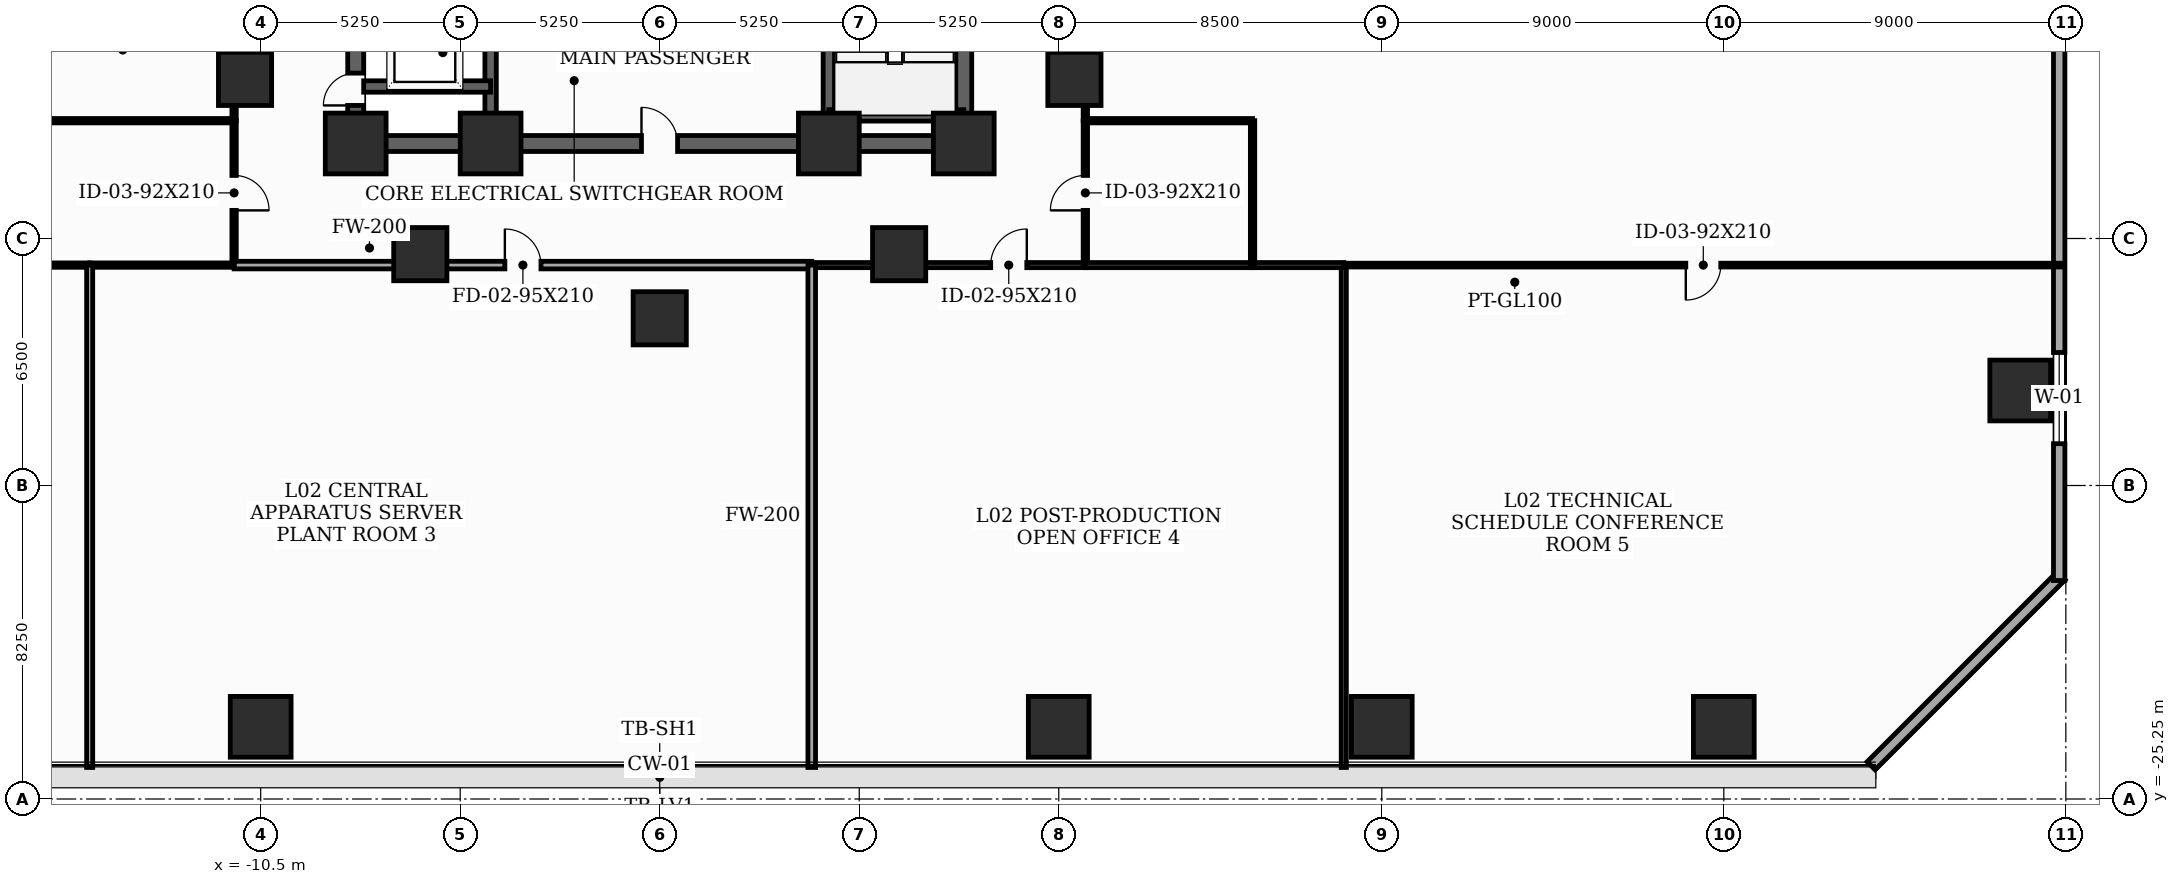
"""IFC4 building model, lengths in metres.
Left out: names, types, materials, properties, quantities, classifications, styles, units other than length and angle.
Written with IfcOpenShell. Run it as: python <this file> out.ifc"""

import sys

from ifc_helpers import new_model, si_unit, direction, frame, frame_2d, origin, origin_2d, place, context, subcontext, project, spatial, rectangle, extrude, element, fill, save


model = new_model("IFC4")
c1 = context("Model", 3, precision=1e-05, world=origin(), true_north=direction((0.0, 1.0)))
c2 = subcontext(c1, "Body", "Model", "MODEL_VIEW")
j1 = project(units=[si_unit("LENGTHUNIT", "METRE"), si_unit("PLANEANGLEUNIT", "RADIAN")], contexts=[c1])
p1 = place(None, origin())
s1 = spatial("IfcSite", under=j1, at=p1, CompositionType="ELEMENT")
p2 = place(p1, origin())
s2 = spatial("IfcBuilding", under=s1, at=p2, CompositionType="ELEMENT")
p3 = place(p2, frame((0.0, 0.0, 10.4)))
s3 = spatial("IfcBuildingStorey", under=s2, at=p3, CompositionType="ELEMENT", Elevation=10.4)
for number, where, z_axis, x_axis in (
    (1, (-8.0, -8.0, 0.0), (0.0, 0.0, 1.0), (1.0, 0.0, 0.0)),
    (2, (-4.45, -8.0, 0.0), (0.0, 0.0, 1.0), (1.0, 0.0, 0.0)),
    (3, (4.45, -8.0, 0.0), (0.0, 0.0, 1.0), (1.0, 0.0, 0.0)),
    (4, (8.0, -8.0, 0.0), (0.0, 0.0, 1.0), (1.0, 0.0, 0.0)),
):
    element("IfcColumn", number, at=place(p3, frame(where, z_axis=z_axis, x_axis=x_axis)), inside=s3, PredefinedType="COLUMN", context=c2, shape_type="SweptSolid", body=[
        extrude(rectangle(XDim=1.6, YDim=1.6, at=origin_2d()), origin(), (0.0, 0.0, 1.0), 5.2),
    ])
for number, where, z_axis, x_axis in (
    (5, (-10.912, -6.3, 0.0), (0.0, 0.0, 1.0), (1.0, 0.0, 0.0)),
    (6, (-6.3, -10.912, 0.0), (0.0, 0.0, 1.0), (1.0, 0.0, 0.0)),
    (7, (0.0, -12.6, 0.0), (0.0, 0.0, 1.0), (1.0, 0.0, 0.0)),
    (8, (6.3, -10.912, 0.0), (0.0, 0.0, 1.0), (1.0, 0.0, 0.0)),
    (9, (10.912, -6.3, 0.0), (0.0, 0.0, 1.0), (1.0, 0.0, 0.0)),
):
    element("IfcColumn", number, at=place(p3, frame(where, z_axis=z_axis, x_axis=x_axis)), inside=s3, PredefinedType="COLUMN", context=c2, shape_type="SweptSolid", body=[
        extrude(rectangle(XDim=1.4, YDim=1.4, at=origin_2d()), origin(), (0.0, 0.0, 1.0), 5.2),
    ])
for number, where, z_axis, x_axis in (
    (10, (-10.5, -23.35, 0.0), (0.0, 0.0, 1.0), (1.0, 0.0, 0.0)),
    (11, (10.5, -23.35, 0.0), (0.0, 0.0, 1.0), (1.0, 0.0, 0.0)),
    (12, (19.0, -23.35, 0.0), (0.0, 0.0, 1.0), (1.0, 0.0, 0.0)),
    (13, (28.0, -23.35, 0.0), (0.0, 0.0, 1.0), (1.0, 0.0, 0.0)),
    (14, (35.8, -14.5, 0.0), (0.0, 0.0, 1.0), (1.0, 0.0, 0.0)),
):
    element("IfcColumn", number, at=place(p3, frame(where, z_axis=z_axis, x_axis=x_axis)), inside=s3, PredefinedType="COLUMN", context=c2, shape_type="SweptSolid", body=[
        extrude(rectangle(XDim=1.6, YDim=1.6, at=origin_2d()), origin(), (0.0, 0.0, 1.0), 5.2),
    ])
p4 = place(p3, frame((31.876, -24.376, 0.0), z_axis=(0.0, 0.0, 1.0), x_axis=(0.707106781187, 0.707106781187, 0.0)))
e15 = element("IfcWall", 15, at=p4, inside=s3, PredefinedType="SOLIDWALL", context=c2, shape_type="SweptSolid", body=[
    extrude(rectangle(XDim=7.071, YDim=0.3, at=frame_2d((3.536, 0.0))), origin(), (0.0, 0.0, 1.0), 4.95),
])
p5 = place(p3, frame((36.825, -19.5, 0.0), z_axis=(0.0, 0.0, 1.0), x_axis=(0.0, 1.0, 0.0)))
e16 = element("IfcWall", 16, at=p5, inside=s3, PredefinedType="SOLIDWALL", context=c2, shape_type="SweptSolid", body=[
    extrude(rectangle(XDim=48.0, YDim=0.3, at=frame_2d((24.0, 0.0))), origin(), (0.0, 0.0, 1.0), 4.95),
])
p6 = place(p5, frame((3.6, 0.0, 0.9)))
e17 = element("IfcOpeningElement", 17, at=p6, cuts=e16, PredefinedType="OPENING", context=c2, shape_type="SweptSolid", body=[
    extrude(rectangle(XDim=2.4, YDim=1.35, at=frame_2d((1.2, 0.675))), frame((0.0, 0.16, 0.0), z_axis=(0.0, -1.0, 0.0), x_axis=(1.0, 0.0, 0.0)), (0.0, 0.0, 1.0), 0.32),
])
p7 = place(p5, frame((22.8, 0.0, 0.9)))
e18 = element("IfcOpeningElement", 18, at=p7, cuts=e16, PredefinedType="OPENING", context=c2, shape_type="SweptSolid", body=[
    extrude(rectangle(XDim=1.8, YDim=1.35, at=frame_2d((0.9, 0.675))), frame((0.0, 0.16, 0.0), z_axis=(0.0, -1.0, 0.0), x_axis=(1.0, 0.0, 0.0)), (0.0, 0.0, 1.0), 0.32),
])
p8 = place(p5, frame((33.8, 0.0, 0.9)))
e19 = element("IfcOpeningElement", 19, at=p8, cuts=e16, PredefinedType="OPENING", context=c2, shape_type="SweptSolid", body=[
    extrude(rectangle(XDim=2.4, YDim=1.35, at=frame_2d((1.2, 0.675))), frame((0.0, 0.16, 0.0), z_axis=(0.0, -1.0, 0.0), x_axis=(1.0, 0.0, 0.0)), (0.0, 0.0, 1.0), 0.32),
])
p9 = place(p3, frame((-8.0, -8.0, 0.0), z_axis=(0.0, 0.0, 1.0), x_axis=(0.0, 1.0, 0.0)))
e20 = element("IfcWall", 20, at=p9, inside=s3, PredefinedType="SHEAR", context=c2, shape_type="SweptSolid", body=[
    extrude(rectangle(XDim=16.0, YDim=0.42, at=frame_2d((8.0, 0.0))), origin(), (0.0, 0.0, 1.0), 4.95),
])
p10 = place(p9, frame((1.002, 0.0, 0.0)))
e21 = element("IfcOpeningElement", 21, at=p10, cuts=e20, PredefinedType="OPENING", context=c2, shape_type="SweptSolid", body=[
    extrude(rectangle(XDim=0.85, YDim=2.02, at=frame_2d((0.425, 1.01))), frame((0.0, 0.22, 0.0), z_axis=(0.0, -1.0, 0.0), x_axis=(1.0, 0.0, 0.0)), (0.0, 0.0, 1.0), 0.44),
])
p11 = place(p9, frame((5.35, 0.0, 0.0)))
e22 = element("IfcOpeningElement", 22, at=p11, cuts=e20, PredefinedType="OPENING", context=c2, shape_type="SweptSolid", body=[
    extrude(rectangle(XDim=1.05, YDim=2.15, at=frame_2d((0.525, 1.075))), frame((0.0, 0.22, 0.0), z_axis=(0.0, -1.0, 0.0), x_axis=(1.0, 0.0, 0.0)), (0.0, 0.0, 1.0), 0.44),
])
p12 = place(p3, frame((8.0, -8.0, 0.0), z_axis=(0.0, 0.0, 1.0), x_axis=(0.0, 1.0, 0.0)))
e23 = element("IfcWall", 23, at=p12, inside=s3, PredefinedType="SHEAR", context=c2, shape_type="SweptSolid", body=[
    extrude(rectangle(XDim=16.0, YDim=0.42, at=frame_2d((8.0, 0.0))), origin(), (0.0, 0.0, 1.0), 4.95),
])
p13 = place(p12, frame((9.6, 0.0, 0.0)))
e24 = element("IfcOpeningElement", 24, at=p13, cuts=e23, PredefinedType="OPENING", context=c2, shape_type="SweptSolid", body=[
    extrude(rectangle(XDim=1.05, YDim=2.15, at=frame_2d((0.525, 1.075))), frame((0.0, 0.22, 0.0), z_axis=(0.0, -1.0, 0.0), x_axis=(1.0, 0.0, 0.0)), (0.0, 0.0, 1.0), 0.44),
])
p14 = place(p12, frame((14.148, 0.0, 0.0)))
e25 = element("IfcOpeningElement", 25, at=p14, cuts=e23, PredefinedType="OPENING", context=c2, shape_type="SweptSolid", body=[
    extrude(rectangle(XDim=0.85, YDim=2.02, at=frame_2d((0.425, 1.01))), frame((0.0, 0.22, 0.0), z_axis=(0.0, -1.0, 0.0), x_axis=(1.0, 0.0, 0.0)), (0.0, 0.0, 1.0), 0.44),
])
p15 = place(p3, frame((-8.0, -8.0, 0.0), z_axis=(0.0, 0.0, 1.0), x_axis=(1.0, 0.0, 0.0)))
e26 = element("IfcWall", 26, at=p15, inside=s3, PredefinedType="SHEAR", context=c2, shape_type="SweptSolid", body=[
    extrude(rectangle(XDim=16.0, YDim=0.42, at=frame_2d((8.0, 0.0))), origin(), (0.0, 0.0, 1.0), 4.95),
])
p16 = place(p15, frame((7.52, 0.0, 0.0)))
e27 = element("IfcOpeningElement", 27, at=p16, cuts=e26, PredefinedType="OPENING", context=c2, shape_type="SweptSolid", body=[
    extrude(rectangle(XDim=0.95, YDim=2.1, at=frame_2d((0.475, 1.05))), frame((0.0, 0.22, 0.0), z_axis=(0.0, -1.0, 0.0), x_axis=(1.0, 0.0, 0.0)), (0.0, 0.0, 1.0), 0.44),
])
for number, where, z_axis, x_axis in (
    (28, (-4.45, -7.79, 0.0), (0.0, 0.0, 1.0), (0.0, 1.0, 0.0)),
    (29, (4.45, -7.79, 0.0), (0.0, 0.0, 1.0), (0.0, 1.0, 0.0)),
):
    element("IfcWall", number, at=place(p3, frame(where, z_axis=z_axis, x_axis=x_axis)), inside=s3, PredefinedType="SHEAR", context=c2, shape_type="SweptSolid", body=[
        extrude(rectangle(XDim=15.58, YDim=0.3, at=frame_2d((7.79, 0.0))), origin(), (0.0, 0.0, 1.0), 4.95),
    ])
p17 = place(p3, frame((4.45, -7.26, 0.0), z_axis=(0.0, 0.0, 1.0), x_axis=(1.0, 0.0, 0.0)))
e30 = element("IfcWall", 30, at=p17, inside=s3, PredefinedType="SHEAR", context=c2, shape_type="SweptSolid", body=[
    extrude(rectangle(XDim=3.55, YDim=0.3, at=frame_2d((1.775, 0.0))), origin(), (0.0, 0.0, 1.0), 4.95),
])
p18 = place(p3, frame((-7.79, -6.5, 0.0), z_axis=(0.0, 0.0, 1.0), x_axis=(1.0, 0.0, 0.0)))
e31 = element("IfcWall", 31, at=p18, inside=s3, PredefinedType="SHEAR", context=c2, shape_type="SweptSolid", body=[
    extrude(rectangle(XDim=3.34, YDim=0.3, at=frame_2d((1.67, 0.0))), origin(), (0.0, 0.0, 1.0), 4.95),
])
p19 = place(p3, frame((-11.2, -3.6, 0.0), z_axis=(0.0, 0.0, 1.0), x_axis=(0.0, -1.0, 0.0)))
e32 = element("IfcWall", 32, at=p19, inside=s3, PredefinedType="PARTITIONING", context=c2, shape_type="SweptSolid", body=[
    extrude(rectangle(XDim=3.8, YDim=0.115, at=frame_2d((1.9, 0.0))), origin(), (0.0, 0.0, 1.0), 4.235),
])
p20 = place(p19, frame((0.604, 0.0, 0.0)))
e33 = element("IfcOpeningElement", 33, at=p20, cuts=e32, PredefinedType="OPENING", context=c2, shape_type="SweptSolid", body=[
    extrude(rectangle(XDim=0.92, YDim=2.1, at=frame_2d((0.46, 1.05))), frame((0.0, 0.067, 0.0), z_axis=(0.0, -1.0, 0.0), x_axis=(1.0, 0.0, 0.0)), (0.0, 0.0, 1.0), 0.135),
])
p21 = place(p3, frame((-11.2, -7.4, 0.0), z_axis=(0.0, 0.0, 1.0), x_axis=(0.0, -1.0, 0.0)))
e34 = element("IfcWall", 34, at=p21, inside=s3, PredefinedType="PARTITIONING", context=c2, shape_type="SweptSolid", body=[
    extrude(rectangle(XDim=3.8, YDim=0.115, at=frame_2d((1.9, 0.0))), origin(), (0.0, 0.0, 1.0), 4.95),
])
p22 = place(p21, frame((1.44, 0.0, 0.0)))
e35 = element("IfcOpeningElement", 35, at=p22, cuts=e34, PredefinedType="OPENING", context=c2, shape_type="SweptSolid", body=[
    extrude(rectangle(XDim=0.92, YDim=2.1, at=frame_2d((0.46, 1.05))), frame((0.0, 0.067, 0.0), z_axis=(0.0, -1.0, 0.0), x_axis=(1.0, 0.0, 0.0)), (0.0, 0.0, 1.0), 0.135),
])
p23 = place(p3, frame((-11.2, -11.2, 0.0), z_axis=(0.0, 0.0, 1.0), x_axis=(1.0, 0.0, 0.0)))
e36 = element("IfcWall", 36, at=p23, inside=s3, PredefinedType="SOLIDWALL", context=c2, shape_type="SweptSolid", body=[
    extrude(rectangle(XDim=15.2, YDim=0.2, at=frame_2d((7.6, 0.0))), origin(), (0.0, 0.0, 1.0), 3.435),
])
p24 = place(p23, frame((7.125, 0.0, 0.0)))
e37 = element("IfcOpeningElement", 37, at=p24, cuts=e36, PredefinedType="OPENING", context=c2, shape_type="SweptSolid", body=[
    extrude(rectangle(XDim=0.95, YDim=2.1, at=frame_2d((0.475, 1.05))), frame((0.0, 0.11, 0.0), z_axis=(0.0, -1.0, 0.0), x_axis=(1.0, 0.0, 0.0)), (0.0, 0.0, 1.0), 0.22),
])
p25 = place(p3, frame((4.0, -11.2, 0.0), z_axis=(0.0, 0.0, 1.0), x_axis=(1.0, 0.0, 0.0)))
e38 = element("IfcWall", 38, at=p25, inside=s3, PredefinedType="PARTITIONING", context=c2, shape_type="SweptSolid", body=[
    extrude(rectangle(XDim=7.2, YDim=0.135, at=frame_2d((3.6, 0.0))), origin(), (0.0, 0.0, 1.0), 3.435),
])
p26 = place(p25, frame((4.709, 0.0, 0.0)))
e39 = element("IfcOpeningElement", 39, at=p26, cuts=e38, PredefinedType="OPENING", context=c2, shape_type="SweptSolid", body=[
    extrude(rectangle(XDim=0.95, YDim=2.1, at=frame_2d((0.475, 1.05))), frame((0.0, 0.077, 0.0), z_axis=(0.0, -1.0, 0.0), x_axis=(1.0, 0.0, 0.0)), (0.0, 0.0, 1.0), 0.155),
])
p27 = place(p3, frame((11.2, -11.2, 0.0), z_axis=(0.0, 0.0, 1.0), x_axis=(0.0, 1.0, 0.0)))
e40 = element("IfcWall", 40, at=p27, inside=s3, PredefinedType="PARTITIONING", context=c2, shape_type="SweptSolid", body=[
    extrude(rectangle(XDim=3.8, YDim=0.115, at=frame_2d((1.9, 0.0))), origin(), (0.0, 0.0, 1.0), 4.95),
])
p28 = place(p27, frame((1.44, 0.0, 0.0)))
e41 = element("IfcOpeningElement", 41, at=p28, cuts=e40, PredefinedType="OPENING", context=c2, shape_type="SweptSolid", body=[
    extrude(rectangle(XDim=0.92, YDim=2.1, at=frame_2d((0.46, 1.05))), frame((0.0, 0.067, 0.0), z_axis=(0.0, -1.0, 0.0), x_axis=(1.0, 0.0, 0.0)), (0.0, 0.0, 1.0), 0.135),
])
p29 = place(p3, frame((11.2, -7.4, 0.0), z_axis=(0.0, 0.0, 1.0), x_axis=(0.0, 1.0, 0.0)))
e42 = element("IfcWall", 42, at=p29, inside=s3, PredefinedType="PARTITIONING", context=c2, shape_type="SweptSolid", body=[
    extrude(rectangle(XDim=11.7, YDim=0.115, at=frame_2d((5.85, 0.0))), origin(), (0.0, 0.0, 1.0), 4.235),
])
p30 = place(p3, frame((-16.2, -7.4, 0.0), z_axis=(0.0, 0.0, 1.0), x_axis=(1.0, 0.0, 0.0)))
e43 = element("IfcWall", 43, at=p30, inside=s3, PredefinedType="PARTITIONING", context=c2, shape_type="SweptSolid", body=[
    extrude(rectangle(XDim=5.0, YDim=0.115, at=frame_2d((2.5, 0.0))), origin(), (0.0, 0.0, 1.0), 4.95),
])
p31 = place(p3, frame((-16.2, -11.2, 0.0), z_axis=(0.0, 0.0, 1.0), x_axis=(1.0, 0.0, 0.0)))
e44 = element("IfcWall", 44, at=p31, inside=s3, PredefinedType="PARTITIONING", context=c2, shape_type="SweptSolid", body=[
    extrude(rectangle(XDim=1.2, YDim=0.115, at=frame_2d((0.6, 0.0))), origin(), (0.0, 0.0, 1.0), 4.95),
])
p32 = place(p3, frame((-15.0, -11.2, 0.0), z_axis=(0.0, 0.0, 1.0), x_axis=(1.0, 0.0, 0.0)))
e45 = element("IfcWall", 45, at=p32, inside=s3, PredefinedType="PARTITIONING", context=c2, shape_type="SweptSolid", body=[
    extrude(rectangle(XDim=3.8, YDim=0.115, at=frame_2d((1.9, 0.0))), origin(), (0.0, 0.0, 1.0), 4.95),
])
p33 = place(p3, frame((-15.0, -24.42, 0.0), z_axis=(0.0, 0.0, 1.0), x_axis=(0.0, 1.0, 0.0)))
e46 = element("IfcWall", 46, at=p33, inside=s3, PredefinedType="PARTITIONING", context=c2, shape_type="SweptSolid", body=[
    extrude(rectangle(XDim=13.22, YDim=0.16, at=frame_2d((6.61, 0.0))), origin(), (0.0, 0.0, 1.0), 3.435),
])
p34 = place(p3, frame((4.0, -24.42, 0.0), z_axis=(0.0, 0.0, 1.0), x_axis=(0.0, 1.0, 0.0)))
e47 = element("IfcWall", 47, at=p34, inside=s3, PredefinedType="SOLIDWALL", context=c2, shape_type="SweptSolid", body=[
    extrude(rectangle(XDim=13.22, YDim=0.2, at=frame_2d((6.61, 0.0))), origin(), (0.0, 0.0, 1.0), 4.235),
])
p35 = place(p3, frame((15.6, -11.2, 0.0), z_axis=(0.0, 0.0, 1.0), x_axis=(-1.0, 0.0, 0.0)))
e48 = element("IfcWall", 48, at=p35, inside=s3, PredefinedType="PARTITIONING", context=c2, shape_type="SweptSolid", body=[
    extrude(rectangle(XDim=4.4, YDim=0.135, at=frame_2d((2.2, 0.0))), origin(), (0.0, 0.0, 1.0), 4.95),
])
p36 = place(p3, frame((18.0, -24.42, 0.0), z_axis=(0.0, 0.0, 1.0), x_axis=(0.0, 1.0, 0.0)))
e49 = element("IfcWall", 49, at=p36, inside=s3, PredefinedType="PARTITIONING", context=c2, shape_type="SweptSolid", body=[
    extrude(rectangle(XDim=13.22, YDim=0.135, at=frame_2d((6.61, 0.0))), origin(), (0.0, 0.0, 1.0), 3.435),
])
p37 = place(p3, frame((18.0, -11.2, 0.0), z_axis=(0.0, 0.0, 1.0), x_axis=(-1.0, 0.0, 0.0)))
e50 = element("IfcWall", 50, at=p37, inside=s3, PredefinedType="PARTITIONING", context=c2, shape_type="SweptSolid", body=[
    extrude(rectangle(XDim=2.4, YDim=0.135, at=frame_2d((1.2, 0.0))), origin(), (0.0, 0.0, 1.0), 4.95),
])
p38 = place(p3, frame((15.6, -11.2, 0.0), z_axis=(0.0, 0.0, 1.0), x_axis=(0.0, 1.0, 0.0)))
e51 = element("IfcWall", 51, at=p38, inside=s3, PredefinedType="PARTITIONING", context=c2, shape_type="SweptSolid", body=[
    extrude(rectangle(XDim=3.8, YDim=0.115, at=frame_2d((1.9, 0.0))), origin(), (0.0, 0.0, 1.0), 4.95),
])
p39 = place(p3, frame((15.6, -7.4, 0.0), z_axis=(0.0, 0.0, 1.0), x_axis=(-1.0, 0.0, 0.0)))
e52 = element("IfcWall", 52, at=p39, inside=s3, PredefinedType="PARTITIONING", context=c2, shape_type="SweptSolid", body=[
    extrude(rectangle(XDim=4.4, YDim=0.115, at=frame_2d((2.2, 0.0))), origin(), (0.0, 0.0, 1.0), 4.95),
])
p40 = place(p3, frame((36.92, -11.2, 0.0), z_axis=(0.0, 0.0, 1.0), x_axis=(-1.0, 0.0, 0.0)))
e53 = element("IfcWall", 53, at=p40, inside=s3, PredefinedType="MOVABLE", context=c2, shape_type="SweptSolid", body=[
    extrude(rectangle(XDim=18.92, YDim=0.1, at=frame_2d((9.46, 0.0))), origin(), (0.0, 0.0, 1.0), 3.435),
])
p41 = place(p40, frame((9.0, 0.0, 0.0)))
e54 = element("IfcOpeningElement", 54, at=p41, cuts=e53, PredefinedType="OPENING", context=c2, shape_type="SweptSolid", body=[
    extrude(rectangle(XDim=0.92, YDim=2.1, at=frame_2d((0.46, 1.05))), frame((0.0, 0.06, 0.0), z_axis=(0.0, -1.0, 0.0), x_axis=(1.0, 0.0, 0.0)), (0.0, 0.0, 1.0), 0.12),
])
p42 = place(p6, origin())
e55 = element("IfcWindow", 55, at=p42, inside=s3, PartitioningType="SINGLE_PANEL", PredefinedType="WINDOW", context=c2, shape_type="SweptSolid", body=[
    extrude(rectangle(XDim=2.4, YDim=1.35, at=frame_2d((1.2, 0.675))), frame((0.0, 0.03, 0.0), z_axis=(0.0, -1.0, 0.0), x_axis=(1.0, 0.0, 0.0)), (0.0, 0.0, 1.0), 0.06),
])
fill(e17, e55)
p43 = place(p10, origin())
e56 = element("IfcDoor", 56, at=p43, inside=s3, OperationType="SINGLE_SWING_LEFT", PredefinedType="TRAPDOOR", context=c2, shape_type="SweptSolid", body=[
    extrude(rectangle(XDim=0.85, YDim=2.02, at=frame_2d((0.425, 1.01))), frame((0.0, 0.025, 0.0), z_axis=(0.0, -1.0, 0.0), x_axis=(1.0, 0.0, 0.0)), (0.0, 0.0, 1.0), 0.05),
])
fill(e21, e56)
p44 = place(p16, origin())
e57 = element("IfcDoor", 57, at=p44, inside=s3, OperationType="SINGLE_SWING_LEFT", PredefinedType="DOOR", context=c2, shape_type="SweptSolid", body=[
    extrude(rectangle(XDim=0.95, YDim=2.1, at=frame_2d((0.475, 1.05))), frame((0.0, 0.025, 0.0), z_axis=(0.0, -1.0, 0.0), x_axis=(1.0, 0.0, 0.0)), (0.0, 0.0, 1.0), 0.05),
])
fill(e27, e57)
p45 = place(p22, origin())
e58 = element("IfcDoor", 58, at=p45, inside=s3, OperationType="SINGLE_SWING_RIGHT", PredefinedType="DOOR", context=c2, shape_type="SweptSolid", body=[
    extrude(rectangle(XDim=0.92, YDim=2.1, at=frame_2d((0.46, 1.05))), frame((0.0, 0.025, 0.0), z_axis=(0.0, -1.0, 0.0), x_axis=(1.0, 0.0, 0.0)), (0.0, 0.0, 1.0), 0.05),
])
fill(e35, e58)
p46 = place(p24, origin())
e59 = element("IfcDoor", 59, at=p46, inside=s3, OperationType="SINGLE_SWING_LEFT", PredefinedType="DOOR", context=c2, shape_type="SweptSolid", body=[
    extrude(rectangle(XDim=0.95, YDim=2.1, at=frame_2d((0.475, 1.05))), frame((0.0, 0.025, 0.0), z_axis=(0.0, -1.0, 0.0), x_axis=(1.0, 0.0, 0.0)), (0.0, 0.0, 1.0), 0.05),
])
fill(e37, e59)
p47 = place(p26, origin())
e60 = element("IfcDoor", 60, at=p47, inside=s3, OperationType="SINGLE_SWING_RIGHT", PredefinedType="DOOR", context=c2, shape_type="SweptSolid", body=[
    extrude(rectangle(XDim=0.95, YDim=2.1, at=frame_2d((0.475, 1.05))), frame((0.0, 0.025, 0.0), z_axis=(0.0, -1.0, 0.0), x_axis=(1.0, 0.0, 0.0)), (0.0, 0.0, 1.0), 0.05),
])
fill(e39, e60)
p48 = place(p28, origin())
e61 = element("IfcDoor", 61, at=p48, inside=s3, OperationType="SINGLE_SWING_LEFT", PredefinedType="DOOR", context=c2, shape_type="SweptSolid", body=[
    extrude(rectangle(XDim=0.92, YDim=2.1, at=frame_2d((0.46, 1.05))), frame((0.0, 0.025, 0.0), z_axis=(0.0, -1.0, 0.0), x_axis=(1.0, 0.0, 0.0)), (0.0, 0.0, 1.0), 0.05),
])
fill(e41, e61)
p49 = place(p41, origin())
e62 = element("IfcDoor", 62, at=p49, inside=s3, OperationType="SINGLE_SWING_RIGHT", PredefinedType="DOOR", context=c2, shape_type="SweptSolid", body=[
    extrude(rectangle(XDim=0.92, YDim=2.1, at=frame_2d((0.46, 1.05))), frame((0.0, 0.025, 0.0), z_axis=(0.0, -1.0, 0.0), x_axis=(1.0, 0.0, 0.0)), (0.0, 0.0, 1.0), 0.05),
])
fill(e54, e62)
save(model, sys.argv[1])
